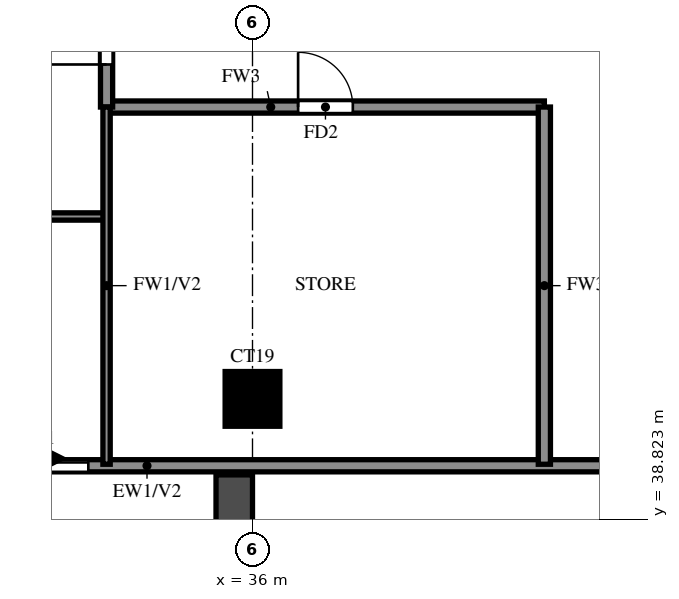
"""IFC4 building model, lengths in metres.
Left out: names, types, materials, properties, quantities, classifications, styles, units other than length and angle.
Written with IfcOpenShell. Run it as: python <this file> out.ifc"""

import sys

from ifc_helpers import new_model, si_unit, direction, frame, frame_2d, origin, origin_2d, place, context, subcontext, project, spatial, rectangle, extrude, source, transform, mapped, element, fill, save


model = new_model("IFC4")
c1 = context("Model", 3, precision=1e-05, world=origin(), true_north=direction((0.0, 1.0)))
c2 = subcontext(c1, "Body", "Model", "MODEL_VIEW")
j1 = project(units=[si_unit("LENGTHUNIT", "METRE"), si_unit("PLANEANGLEUNIT", "RADIAN")], contexts=[c1])
p1 = place(None, origin())
s1 = spatial("IfcSite", under=j1, at=p1, CompositionType="ELEMENT")
p2 = place(p1, origin())
s2 = spatial("IfcBuilding", under=s1, at=p2, CompositionType="ELEMENT")
p3 = place(p2, frame((0.0, 0.0, 178.0)))
s3 = spatial("IfcBuildingStorey", under=s2, at=p3, CompositionType="ELEMENT", Elevation=178.0)
m1 = source(origin(), c2, "Body", "SweptSolid", [
    extrude(rectangle(XDim=0.9, YDim=0.9, at=origin_2d()), origin(), (0.0, 0.0, 1.0), 3.2),
])
p4 = place(p3, frame((36.0, 40.8, 0.0), z_axis=(0.0, 0.0, 1.0), x_axis=(1.0, 0.0, 0.0)))
e1 = element("IfcColumn", 1, at=p4, inside=s3, PredefinedType="COLUMN", context=c2, shape_type="MappedRepresentation", body=[
    mapped(m1, transform((0.0, 0.0, 0.0))),
])
p5 = place(p3, frame((18.2, 39.7, 0.0), z_axis=(0.0, 0.0, 1.0), x_axis=(1.0, 0.0, 0.0)))
e2 = element("IfcWall", 2, at=p5, inside=s3, PredefinedType="SOLIDWALL", context=c2, shape_type="SweptSolid", body=[
    extrude(rectangle(XDim=23.8, YDim=0.2, at=frame_2d((11.9, 0.0))), origin(), (0.0, 0.0, 1.0), 3.2),
])
p6 = place(p5, frame((13.3, 0.0, 0.0)))
e3 = element("IfcOpeningElement", 3, at=p6, cuts=e2, PredefinedType="OPENING", context=c2, shape_type="SweptSolid", body=[
    extrude(rectangle(XDim=1.8, YDim=2.4, at=frame_2d((0.9, 1.2))), frame((0.0, 0.11, 0.0), z_axis=(0.0, -1.0, 0.0), x_axis=(1.0, 0.0, 0.0)), (0.0, 0.0, 1.0), 0.22),
])
p7 = place(p5, frame((0.9, 0.0, 0.6)))
e4 = element("IfcOpeningElement", 4, at=p7, cuts=e2, PredefinedType="OPENING", context=c2, shape_type="SweptSolid", body=[
    extrude(rectangle(XDim=2.4, YDim=2.4, at=frame_2d((1.2, 1.2))), frame((0.0, 0.11, 0.0), z_axis=(0.0, -1.0, 0.0), x_axis=(1.0, 0.0, 0.0)), (0.0, 0.0, 1.0), 0.22),
])
p8 = place(p5, frame((3.9, 0.0, 0.6)))
e5 = element("IfcOpeningElement", 5, at=p8, cuts=e2, PredefinedType="OPENING", context=c2, shape_type="SweptSolid", body=[
    extrude(rectangle(XDim=2.4, YDim=2.4, at=frame_2d((1.2, 1.2))), frame((0.0, 0.11, 0.0), z_axis=(0.0, -1.0, 0.0), x_axis=(1.0, 0.0, 0.0)), (0.0, 0.0, 1.0), 0.22),
])
p9 = place(p5, frame((7.6, 0.0, 0.6)))
e6 = element("IfcOpeningElement", 6, at=p9, cuts=e2, PredefinedType="OPENING", context=c2, shape_type="SweptSolid", body=[
    extrude(rectangle(XDim=2.4, YDim=2.4, at=frame_2d((1.2, 1.2))), frame((0.0, 0.11, 0.0), z_axis=(0.0, -1.0, 0.0), x_axis=(1.0, 0.0, 0.0)), (0.0, 0.0, 1.0), 0.22),
])
p10 = place(p5, frame((11.5, 0.0, 0.6)))
e7 = element("IfcOpeningElement", 7, at=p10, cuts=e2, PredefinedType="OPENING", context=c2, shape_type="SweptSolid", body=[
    extrude(rectangle(XDim=1.2, YDim=2.4, at=frame_2d((0.6, 1.2))), frame((0.0, 0.11, 0.0), z_axis=(0.0, -1.0, 0.0), x_axis=(1.0, 0.0, 0.0)), (0.0, 0.0, 1.0), 0.22),
])
p11 = place(p3, frame((35.7, 39.55, 0.0), z_axis=(0.0, 0.0, 1.0), x_axis=(0.0, -1.0, 0.0)))
e8 = element("IfcWall", 8, at=p11, inside=s3, PredefinedType="SOLIDWALL", context=c2, shape_type="SweptSolid", body=[
    extrude(rectangle(XDim=2.65, YDim=0.6, at=frame_2d((1.325, 0.0))), origin(), (0.0, 0.0, 1.0), 2.85),
])
p12 = place(p3, frame((33.6, 45.6, 0.0), z_axis=(0.0, 0.0, 1.0), x_axis=(1.0, 0.0, 0.0)))
e9 = element("IfcWall", 9, at=p12, inside=s3, PredefinedType="SOLIDWALL", context=c2, shape_type="SweptSolid", body=[
    extrude(rectangle(XDim=7.2, YDim=0.2, at=frame_2d((3.6, 0.0))), origin(), (0.0, 0.0, 1.0), 3.2),
])
p13 = place(p12, frame((3.15, 0.0, 0.0)))
e10 = element("IfcOpeningElement", 10, at=p13, cuts=e9, PredefinedType="OPENING", context=c2, shape_type="SweptSolid", body=[
    extrude(rectangle(XDim=0.9, YDim=2.1, at=frame_2d((0.45, 1.05))), frame((0.0, 0.11, 0.0), z_axis=(0.0, -1.0, 0.0), x_axis=(1.0, 0.0, 0.0)), (0.0, 0.0, 1.0), 0.22),
])
p14 = place(p3, frame((33.6, 45.6, 0.0), z_axis=(0.0, 0.0, 1.0), x_axis=(0.0, 1.0, 0.0)))
e11 = element("IfcWall", 11, at=p14, inside=s3, PredefinedType="SOLIDWALL", context=c2, shape_type="SweptSolid", body=[
    extrude(rectangle(XDim=8.4, YDim=0.2, at=frame_2d((4.2, 0.0))), origin(), (0.0, 0.0, 1.0), 3.2),
])
p15 = place(p14, frame((0.7, 0.0, 0.0)))
e12 = element("IfcOpeningElement", 12, at=p15, cuts=e11, PredefinedType="OPENING", context=c2, shape_type="SweptSolid", body=[
    extrude(rectangle(XDim=1.0, YDim=2.1, at=frame_2d((0.5, 1.05))), frame((0.0, 0.11, 0.0), z_axis=(0.0, -1.0, 0.0), x_axis=(1.0, 0.0, 0.0)), (0.0, 0.0, 1.0), 0.22),
])
p16 = place(p14, frame((6.7, 0.0, 0.0)))
e13 = element("IfcOpeningElement", 13, at=p16, cuts=e11, PredefinedType="OPENING", context=c2, shape_type="SweptSolid", body=[
    extrude(rectangle(XDim=1.0, YDim=2.1, at=frame_2d((0.5, 1.05))), frame((0.0, 0.11, 0.0), z_axis=(0.0, -1.0, 0.0), x_axis=(1.0, 0.0, 0.0)), (0.0, 0.0, 1.0), 0.22),
])
p17 = place(p3, frame((40.8, 39.725, 0.0), z_axis=(0.0, 0.0, 1.0), x_axis=(0.0, 1.0, 0.0)))
e14 = element("IfcWall", 14, at=p17, inside=s3, PredefinedType="SOLIDWALL", context=c2, shape_type="SweptSolid", body=[
    extrude(rectangle(XDim=5.875, YDim=0.2, at=frame_2d((2.938, 0.0))), origin(), (0.0, 0.0, 1.0), 3.2),
])
p18 = place(p3, frame((25.2, 43.8, 0.0), z_axis=(0.0, 0.0, 1.0), x_axis=(1.0, 0.0, 0.0)))
e15 = element("IfcWall", 15, at=p18, inside=s3, PredefinedType="PARTITIONING", context=c2, shape_type="SweptSolid", body=[
    extrude(rectangle(XDim=8.4, YDim=0.12, at=frame_2d((4.2, 0.0))), origin(), (0.0, 0.0, 1.0), 3.2),
])
p19 = place(p18, frame((1.35, 0.0, 0.0)))
e16 = element("IfcOpeningElement", 16, at=p19, cuts=e15, PredefinedType="OPENING", context=c2, shape_type="SweptSolid", body=[
    extrude(rectangle(XDim=0.9, YDim=2.1, at=frame_2d((0.45, 1.05))), frame((0.0, 0.07, 0.0), z_axis=(0.0, -1.0, 0.0), x_axis=(1.0, 0.0, 0.0)), (0.0, 0.0, 1.0), 0.14),
])
p20 = place(p18, frame((5.55, 0.0, 0.0)))
e17 = element("IfcOpeningElement", 17, at=p20, cuts=e15, PredefinedType="OPENING", context=c2, shape_type="SweptSolid", body=[
    extrude(rectangle(XDim=0.9, YDim=2.1, at=frame_2d((0.45, 1.05))), frame((0.0, 0.07, 0.0), z_axis=(0.0, -1.0, 0.0), x_axis=(1.0, 0.0, 0.0)), (0.0, 0.0, 1.0), 0.14),
])
p21 = place(p3, frame((33.6, 39.725, 0.0), z_axis=(0.0, 0.0, 1.0), x_axis=(0.0, 1.0, 0.0)))
e18 = element("IfcWall", 18, at=p21, inside=s3, PredefinedType="PARTITIONING", context=c2, shape_type="SweptSolid", body=[
    extrude(rectangle(XDim=5.875, YDim=0.12, at=frame_2d((2.938, 0.0))), origin(), (0.0, 0.0, 1.0), 3.2),
])
p22 = place(p6, origin())
e19 = element("IfcDoor", 19, at=p22, inside=s3, OperationType="DOUBLE_DOOR_SLIDING", PredefinedType="DOOR", context=c2, shape_type="SweptSolid", body=[
    extrude(rectangle(XDim=1.8, YDim=2.4, at=frame_2d((0.9, 1.2))), frame((0.0, 0.025, 0.0), z_axis=(0.0, -1.0, 0.0), x_axis=(1.0, 0.0, 0.0)), (0.0, 0.0, 1.0), 0.05),
])
fill(e3, e19)
p23 = place(p15, origin())
e20 = element("IfcDoor", 20, at=p23, inside=s3, OperationType="SINGLE_SWING_LEFT", PredefinedType="DOOR", context=c2, shape_type="SweptSolid", body=[
    extrude(rectangle(XDim=1.0, YDim=2.1, at=frame_2d((0.5, 1.05))), frame((0.0, 0.025, 0.0), z_axis=(0.0, -1.0, 0.0), x_axis=(1.0, 0.0, 0.0)), (0.0, 0.0, 1.0), 0.05),
])
fill(e12, e20)
p24 = place(p13, origin())
e21 = element("IfcDoor", 21, at=p24, inside=s3, OperationType="SINGLE_SWING_LEFT", PredefinedType="DOOR", context=c2, shape_type="SweptSolid", body=[
    extrude(rectangle(XDim=0.9, YDim=2.1, at=frame_2d((0.45, 1.05))), frame((0.0, 0.025, 0.0), z_axis=(0.0, -1.0, 0.0), x_axis=(1.0, 0.0, 0.0)), (0.0, 0.0, 1.0), 0.05),
])
fill(e10, e21)
save(model, sys.argv[1])
